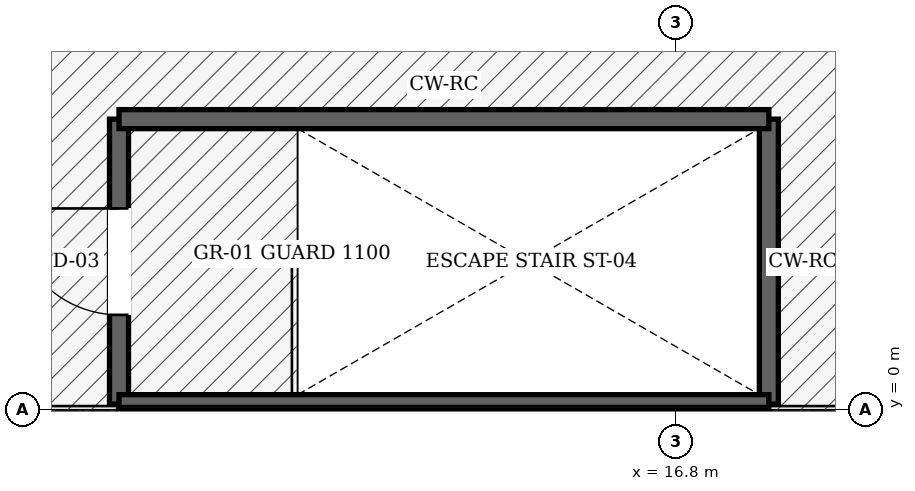
"""IFC4 building model, lengths in metres.
Left out: names, types, materials, properties, quantities, classifications, styles, units other than length and angle.
Written with IfcOpenShell. Run it as: python <this file> out.ifc"""

import sys

from ifc_helpers import new_model, si_unit, direction, frame, frame_2d, origin, place, context, subcontext, project, spatial, rectangle, extrude, element, fill, save


model = new_model("IFC4")
c1 = context("Model", 3, precision=1e-05, world=origin(), true_north=direction((0.0, 1.0)))
c2 = subcontext(c1, "Body", "Model", "MODEL_VIEW")
j1 = project(units=[si_unit("LENGTHUNIT", "METRE"), si_unit("PLANEANGLEUNIT", "RADIAN")], contexts=[c1])
p1 = place(None, origin())
s1 = spatial("IfcSite", under=j1, at=p1, CompositionType="ELEMENT")
p2 = place(p1, origin())
s2 = spatial("IfcBuilding", under=s1, at=p2, CompositionType="ELEMENT")
p3 = place(p2, frame((0.0, 0.0, 10.2)))
s3 = spatial("IfcBuildingStorey", under=s2, at=p3, CompositionType="ELEMENT", Elevation=10.2)
p4 = place(p3, frame((9.475, 0.075, 0.0), z_axis=(0.0, 0.0, 1.0), x_axis=(0.0, 1.0, 0.0)))
e1 = element("IfcWall", 1, at=p4, inside=s3, PredefinedType="SHEAR", context=c2, shape_type="SweptSolid", body=[
    extrude(rectangle(XDim=3.75, YDim=0.25, at=frame_2d((1.875, 0.0))), origin(), (0.0, 0.0, 1.0), 4.56),
])
p5 = place(p4, frame((1.175, 0.0, 0.0)))
e2 = element("IfcOpeningElement", 2, at=p5, cuts=e1, PredefinedType="OPENING", context=c2, shape_type="SweptSolid", body=[
    extrude(rectangle(XDim=1.4, YDim=2.25, at=frame_2d((0.7, 1.125))), frame((0.0, 0.135, 0.0), z_axis=(0.0, -1.0, 0.0), x_axis=(1.0, 0.0, 0.0)), (0.0, 0.0, 1.0), 0.27),
])
p6 = place(p3, frame((18.025, 3.825, 0.0), z_axis=(0.0, 0.0, 1.0), x_axis=(0.0, -1.0, 0.0)))
e3 = element("IfcWall", 3, at=p6, inside=s3, PredefinedType="SHEAR", context=c2, shape_type="SweptSolid", body=[
    extrude(rectangle(XDim=3.75, YDim=0.25, at=frame_2d((1.875, 0.0))), origin(), (0.0, 0.0, 1.0), 4.56),
])
for number, where, z_axis, x_axis in (
    (4, (18.025, 0.075, 0.0), (0.0, 0.0, 1.0), (-1.0, 0.0, 0.0)),
    (5, (9.475, 3.825, 0.0), (0.0, 0.0, 1.0), (1.0, 0.0, 0.0)),
):
    element("IfcWall", number, at=place(p3, frame(where, z_axis=z_axis, x_axis=x_axis)), inside=s3, PredefinedType="SHEAR", context=c2, shape_type="SweptSolid", body=[
        extrude(rectangle(XDim=8.55, YDim=0.25, at=frame_2d((4.275, 0.0))), origin(), (0.0, 0.0, 1.0), 4.56),
    ])
p7 = place(p5, origin())
e6 = element("IfcDoor", 6, at=p7, inside=s3, OperationType="SINGLE_SWING_RIGHT", PredefinedType="DOOR", context=c2, shape_type="SweptSolid", body=[
    extrude(rectangle(XDim=1.4, YDim=2.25, at=frame_2d((0.7, 1.125))), frame((0.0, 0.025, 0.0), z_axis=(0.0, -1.0, 0.0), x_axis=(1.0, 0.0, 0.0)), (0.0, 0.0, 1.0), 0.05),
])
fill(e2, e6)
save(model, sys.argv[1])
